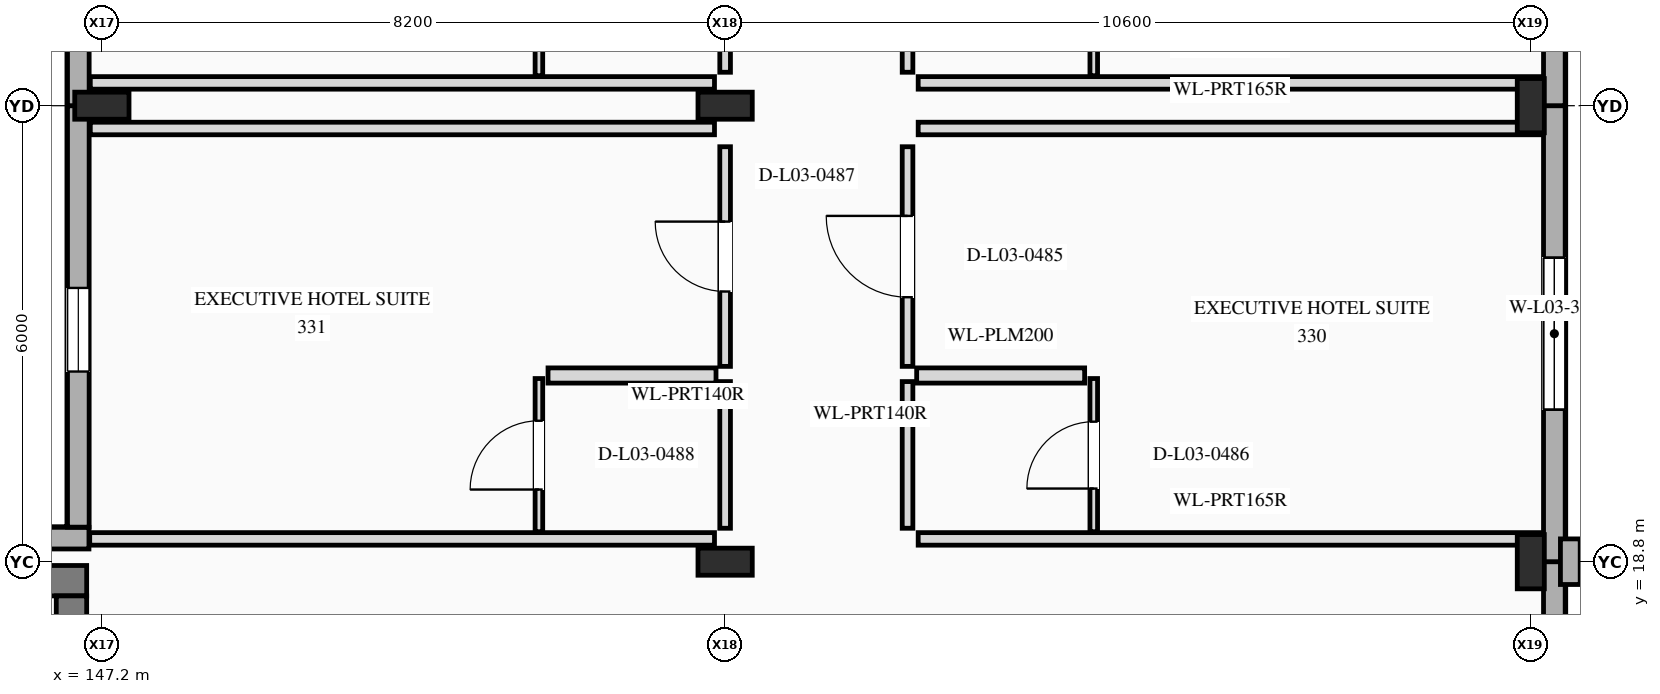
"""IFC4 building model, lengths in metres.
Left out: names, types, materials, properties, quantities, classifications, styles, units other than length and angle.
Written with IfcOpenShell. Run it as: python <this file> out.ifc"""

import sys

from ifc_helpers import new_model, si_unit, direction, frame, frame_2d, origin, origin_2d, place, context, subcontext, project, spatial, rectangle, i_section, extrude, element, fill, save


model = new_model("IFC4")
c1 = context("Model", 3, precision=1e-05, world=origin(), true_north=direction((0.0, 1.0)))
c2 = subcontext(c1, "Body", "Model", "MODEL_VIEW")
j1 = project(units=[si_unit("LENGTHUNIT", "METRE"), si_unit("PLANEANGLEUNIT", "RADIAN")], contexts=[c1])
p1 = place(None, origin())
s1 = spatial("IfcSite", under=j1, at=p1, CompositionType="ELEMENT")
p2 = place(p1, origin())
s2 = spatial("IfcBuilding", under=s1, at=p2, CompositionType="ELEMENT")
p3 = place(p2, frame((0.0, 0.0, 15.6)))
s3 = spatial("IfcBuildingStorey", under=s2, at=p3, CompositionType="ELEMENT", Elevation=15.6)
for number, where, z_axis, x_axis in (
    (1, (147.2, 24.8, 0.0), (0.0, 0.0, 1.0), (0.0, 1.0, 0.0)),
    (2, (155.4, 18.8, 0.0), (0.0, 0.0, 1.0), (0.0, 1.0, 0.0)),
    (3, (155.4, 24.8, 0.0), (0.0, 0.0, 1.0), (0.0, 1.0, 0.0)),
    (4, (166.0, 18.8, 0.0), (0.0, 0.0, 1.0), (1.0, 0.0, 0.0)),
    (5, (166.0, 24.8, 0.0), (0.0, 0.0, 1.0), (1.0, 0.0, 0.0)),
):
    element("IfcColumn", number, at=place(p3, frame(where, z_axis=z_axis, x_axis=x_axis)), inside=s3, PredefinedType="COLUMN", context=c2, shape_type="SweptSolid", body=[
        extrude(i_section(OverallWidth=0.356, OverallDepth=0.714, WebThickness=0.019, FlangeThickness=0.034, at=origin_2d()), origin(), (0.0, 0.0, 1.0), 3.9),
    ])
p4 = place(p3, frame((166.31, 8.2, 0.0), z_axis=(0.0, 0.0, 1.0), x_axis=(0.0, 1.0, 0.0)))
e6 = element("IfcWall", 6, at=p4, inside=s3, PredefinedType="STANDARD", context=c2, shape_type="SweptSolid", body=[
    extrude(rectangle(XDim=10.6, YDim=0.285, at=frame_2d((5.3, 0.0))), origin(), (0.0, 0.0, 1.0), 3.9),
])
p5 = place(p4, frame((4.55, 0.0, 0.88)))
e7 = element("IfcOpeningElement", 7, at=p5, cuts=e6, PredefinedType="OPENING", context=c2, shape_type="SweptSolid", body=[
    extrude(rectangle(XDim=1.5, YDim=1.7, at=frame_2d((0.75, 0.85))), frame((0.0, 0.152, 0.0), z_axis=(0.0, -1.0, 0.0), x_axis=(1.0, 0.0, 0.0)), (0.0, 0.0, 1.0), 0.305),
])
p6 = place(p3, frame((166.31, 18.8, 0.0), z_axis=(0.0, 0.0, 1.0), x_axis=(0.0, 1.0, 0.0)))
e8 = element("IfcWall", 8, at=p6, inside=s3, PredefinedType="STANDARD", context=c2, shape_type="SweptSolid", body=[
    extrude(rectangle(XDim=6.0, YDim=0.285, at=frame_2d((3.0, 0.0))), origin(), (0.0, 0.0, 1.0), 3.9),
])
p7 = place(p6, frame((2.0, 0.0, 0.85)))
e9 = element("IfcOpeningElement", 9, at=p7, cuts=e8, PredefinedType="OPENING", context=c2, shape_type="SweptSolid", body=[
    extrude(rectangle(XDim=2.0, YDim=1.65, at=frame_2d((1.0, 0.825))), frame((0.0, 0.152, 0.0), z_axis=(0.0, -1.0, 0.0), x_axis=(1.0, 0.0, 0.0)), (0.0, 0.0, 1.0), 0.305),
])
p8 = place(p3, frame((166.52, 18.5, 0.0), z_axis=(0.0, 0.0, 1.0), x_axis=(0.0, 1.0, 0.0)))
e10 = element("IfcWall", 10, at=p8, inside=s3, PredefinedType="ELEMENTEDWALL", context=c2, shape_type="SweptSolid", body=[
    extrude(rectangle(XDim=0.6, YDim=0.26, at=frame_2d((0.3, 0.0))), origin(), (0.0, 0.0, 1.0), 3.9),
])
p9 = place(p3, frame((166.31, 24.8, 0.0), z_axis=(0.0, 0.0, 1.0), x_axis=(0.0, 1.0, 0.0)))
e11 = element("IfcWall", 11, at=p9, inside=s3, PredefinedType="STANDARD", context=c2, shape_type="SweptSolid", body=[
    extrude(rectangle(XDim=1.34, YDim=0.285, at=frame_2d((0.67, 0.0))), origin(), (0.0, 0.0, 1.0), 3.9),
])
p10 = place(p3, frame((147.03, 19.11, 0.0), z_axis=(0.0, 0.0, 1.0), x_axis=(-1.0, 0.0, 0.0)))
e12 = element("IfcWall", 12, at=p10, inside=s3, PredefinedType="STANDARD", context=c2, shape_type="SweptSolid", body=[
    extrude(rectangle(XDim=11.03, YDim=0.285, at=frame_2d((5.515, 0.0))), origin(), (0.0, 0.0, 1.0), 3.9),
])
p11 = place(p3, frame((146.89, 19.254, 0.0), z_axis=(0.0, 0.0, 1.0), x_axis=(0.0, 1.0, 0.0)))
e13 = element("IfcWall", 13, at=p11, inside=s3, PredefinedType="STANDARD", context=c2, shape_type="SweptSolid", body=[
    extrude(rectangle(XDim=5.546, YDim=0.285, at=frame_2d((2.773, 0.0))), origin(), (0.0, 0.0, 1.0), 3.9),
])
p12 = place(p11, frame((2.048, 0.0, 0.85)))
e14 = element("IfcOpeningElement", 14, at=p12, cuts=e13, PredefinedType="OPENING", context=c2, shape_type="SweptSolid", body=[
    extrude(rectangle(XDim=1.1, YDim=1.5, at=frame_2d((0.55, 0.75))), frame((0.0, 0.152, 0.0), z_axis=(0.0, -1.0, 0.0), x_axis=(1.0, 0.0, 0.0)), (0.0, 0.0, 1.0), 0.305),
])
p13 = place(p3, frame((146.89, 24.8, 0.0), z_axis=(0.0, 0.0, 1.0), x_axis=(0.0, 1.0, 0.0)))
e15 = element("IfcWall", 15, at=p13, inside=s3, PredefinedType="STANDARD", context=c2, shape_type="SweptSolid", body=[
    extrude(rectangle(XDim=8.4, YDim=0.285, at=frame_2d((4.2, 0.0))), origin(), (0.0, 0.0, 1.0), 3.9),
])
p14 = place(p13, frame((3.3, 0.0, 0.85)))
e16 = element("IfcOpeningElement", 16, at=p14, cuts=e15, PredefinedType="OPENING", context=c2, shape_type="SweptSolid", body=[
    extrude(rectangle(XDim=1.8, YDim=1.8, at=frame_2d((0.9, 0.9))), frame((0.0, 0.152, 0.0), z_axis=(0.0, -1.0, 0.0), x_axis=(1.0, 0.0, 0.0)), (0.0, 0.0, 1.0), 0.305),
])
p15 = place(p3, frame((147.0, 18.55, 0.0), z_axis=(0.0, 0.0, 1.0), x_axis=(-1.0, 0.0, 0.0)))
e17 = element("IfcWall", 17, at=p15, inside=s3, PredefinedType="SHEAR", context=c2, shape_type="SweptSolid", body=[
    extrude(rectangle(XDim=10.6, YDim=0.4, at=frame_2d((5.3, 0.0))), origin(), (0.0, 0.0, 1.0), 3.9),
])
p16 = place(p3, frame((146.8, 11.0, 0.0), z_axis=(0.0, 0.0, 1.0), x_axis=(0.0, 1.0, 0.0)))
e18 = element("IfcWall", 18, at=p16, inside=s3, PredefinedType="SHEAR", context=c2, shape_type="SweptSolid", body=[
    extrude(rectangle(XDim=7.35, YDim=0.4, at=frame_2d((3.675, 0.0))), origin(), (0.0, 0.0, 1.0), 3.9),
])
p17 = place(p16, frame((5.0, 0.0, 0.0)))
e19 = element("IfcOpeningElement", 19, at=p17, cuts=e18, PredefinedType="OPENING", context=c2, shape_type="SweptSolid", body=[
    extrude(rectangle(XDim=0.95, YDim=2.2, at=frame_2d((0.475, 1.1))), frame((0.0, 0.21, 0.0), z_axis=(0.0, -1.0, 0.0), x_axis=(1.0, 0.0, 0.0)), (0.0, 0.0, 1.0), 0.42),
])
p18 = place(p16, frame((0.175, 0.0, 0.0)))
e20 = element("IfcOpeningElement", 20, at=p18, cuts=e18, PredefinedType="OPENING", context=c2, shape_type="SweptSolid", body=[
    extrude(rectangle(XDim=1.15, YDim=2.25, at=frame_2d((0.575, 1.125))), frame((0.0, 0.21, 0.0), z_axis=(0.0, -1.0, 0.0), x_axis=(1.0, 0.0, 0.0)), (0.0, 0.0, 1.0), 0.42),
])
p19 = place(p16, frame((1.875, 0.0, 0.0)))
e21 = element("IfcOpeningElement", 21, at=p19, cuts=e18, PredefinedType="OPENING", context=c2, shape_type="SweptSolid", body=[
    extrude(rectangle(XDim=1.15, YDim=2.25, at=frame_2d((0.575, 1.125))), frame((0.0, 0.21, 0.0), z_axis=(0.0, -1.0, 0.0), x_axis=(1.0, 0.0, 0.0)), (0.0, 0.0, 1.0), 0.42),
])
p20 = place(p3, frame((157.8, 19.24, 0.0), z_axis=(0.0, 0.0, 1.0), x_axis=(0.0, 1.0, 0.0)))
e22 = element("IfcWall", 22, at=p20, inside=s3, PredefinedType="PARTITIONING", context=c2, shape_type="SweptSolid", body=[
    extrude(rectangle(XDim=1.93, YDim=0.14, at=frame_2d((0.965, 0.0))), origin(), (0.0, 0.0, 1.0), 3.158),
])
p21 = place(p3, frame((157.8, 21.37, 0.0), z_axis=(0.0, 0.0, 1.0), x_axis=(0.0, 1.0, 0.0)))
e23 = element("IfcWall", 23, at=p21, inside=s3, PredefinedType="PARTITIONING", context=c2, shape_type="SweptSolid", body=[
    extrude(rectangle(XDim=2.89, YDim=0.14, at=frame_2d((1.445, 0.0))), origin(), (0.0, 0.0, 1.0), 3.158),
])
p22 = place(p21, frame((0.91, 0.0, 0.0)))
e24 = element("IfcOpeningElement", 24, at=p22, cuts=e23, PredefinedType="OPENING", context=c2, shape_type="SweptSolid", body=[
    extrude(rectangle(XDim=1.07, YDim=2.4, at=frame_2d((0.535, 1.2))), frame((0.0, 0.08, 0.0), z_axis=(0.0, -1.0, 0.0), x_axis=(1.0, 0.0, 0.0)), (0.0, 0.0, 1.0), 0.16),
])
for number, where, z_axis, x_axis in (
    (25, (157.94, 19.1, 0.0), (0.0, 0.0, 1.0), (1.0, 0.0, 0.0)),
    (26, (157.94, 24.5, 0.0), (0.0, 0.0, 1.0), (1.0, 0.0, 0.0)),
):
    element("IfcWall", number, at=place(p3, frame(where, z_axis=z_axis, x_axis=x_axis)), inside=s3, PredefinedType="PARTITIONING", context=c2, shape_type="SweptSolid", body=[
        extrude(rectangle(XDim=8.213, YDim=0.165, at=frame_2d((4.106, 0.0))), origin(), (0.0, 0.0, 1.0), 2.99),
    ])
p23 = place(p3, frame((157.92, 21.25, 0.0), z_axis=(0.0, 0.0, 1.0), x_axis=(1.0, 0.0, 0.0)))
e27 = element("IfcWall", 27, at=p23, inside=s3, PredefinedType="PLUMBINGWALL", context=c2, shape_type="SweptSolid", body=[
    extrude(rectangle(XDim=2.21, YDim=0.2, at=frame_2d((1.105, 0.0))), origin(), (0.0, 0.0, 1.0), 3.6),
])
p24 = place(p3, frame((160.25, 19.195, 0.0), z_axis=(0.0, 0.0, 1.0), x_axis=(0.0, 1.0, 0.0)))
e28 = element("IfcWall", 28, at=p24, inside=s3, PredefinedType="PARTITIONING", context=c2, shape_type="SweptSolid", body=[
    extrude(rectangle(XDim=2.015, YDim=0.1, at=frame_2d((1.008, 0.0))), origin(), (0.0, 0.0, 1.0), 3.158),
])
p25 = place(p24, frame((0.568, 0.0, 0.0)))
e29 = element("IfcOpeningElement", 29, at=p25, cuts=e28, PredefinedType="OPENING", context=c2, shape_type="SweptSolid", body=[
    extrude(rectangle(XDim=0.88, YDim=2.1, at=frame_2d((0.44, 1.05))), frame((0.0, 0.06, 0.0), z_axis=(0.0, -1.0, 0.0), x_axis=(1.0, 0.0, 0.0)), (0.0, 0.0, 1.0), 0.12),
])
p26 = place(p3, frame((155.4, 19.24, 0.0), z_axis=(0.0, 0.0, 1.0), x_axis=(0.0, 1.0, 0.0)))
e30 = element("IfcWall", 30, at=p26, inside=s3, PredefinedType="PARTITIONING", context=c2, shape_type="SweptSolid", body=[
    extrude(rectangle(XDim=1.93, YDim=0.14, at=frame_2d((0.965, 0.0))), origin(), (0.0, 0.0, 1.0), 3.074),
])
p27 = place(p3, frame((155.4, 21.37, 0.0), z_axis=(0.0, 0.0, 1.0), x_axis=(0.0, 1.0, 0.0)))
e31 = element("IfcWall", 31, at=p27, inside=s3, PredefinedType="PARTITIONING", context=c2, shape_type="SweptSolid", body=[
    extrude(rectangle(XDim=2.89, YDim=0.14, at=frame_2d((1.445, 0.0))), origin(), (0.0, 0.0, 1.0), 3.074),
])
p28 = place(p27, frame((0.985, 0.0, 0.0)))
e32 = element("IfcOpeningElement", 32, at=p28, cuts=e31, PredefinedType="OPENING", context=c2, shape_type="SweptSolid", body=[
    extrude(rectangle(XDim=0.92, YDim=2.15, at=frame_2d((0.46, 1.075))), frame((0.0, 0.08, 0.0), z_axis=(0.0, -1.0, 0.0), x_axis=(1.0, 0.0, 0.0)), (0.0, 0.0, 1.0), 0.16),
])
p29 = place(p3, frame((147.04, 19.1, 0.0), z_axis=(0.0, 0.0, 1.0), x_axis=(1.0, 0.0, 0.0)))
e33 = element("IfcWall", 33, at=p29, inside=s3, PredefinedType="PARTITIONING", context=c2, shape_type="SweptSolid", body=[
    extrude(rectangle(XDim=8.22, YDim=0.165, at=frame_2d((4.11, 0.0))), origin(), (0.0, 0.0, 1.0), 3.6),
])
p30 = place(p3, frame((147.048, 24.5, 0.0), z_axis=(0.0, 0.0, 1.0), x_axis=(1.0, 0.0, 0.0)))
e34 = element("IfcWall", 34, at=p30, inside=s3, PredefinedType="PARTITIONING", context=c2, shape_type="SweptSolid", body=[
    extrude(rectangle(XDim=8.212, YDim=0.165, at=frame_2d((4.106, 0.0))), origin(), (0.0, 0.0, 1.0), 3.013),
])
p31 = place(p3, frame((153.07, 21.25, 0.0), z_axis=(0.0, 0.0, 1.0), x_axis=(1.0, 0.0, 0.0)))
e35 = element("IfcWall", 35, at=p31, inside=s3, PredefinedType="PLUMBINGWALL", context=c2, shape_type="SweptSolid", body=[
    extrude(rectangle(XDim=2.21, YDim=0.2, at=frame_2d((1.105, 0.0))), origin(), (0.0, 0.0, 1.0), 3.6),
])
p32 = place(p3, frame((152.95, 19.195, 0.0), z_axis=(0.0, 0.0, 1.0), x_axis=(0.0, 1.0, 0.0)))
e36 = element("IfcWall", 36, at=p32, inside=s3, PredefinedType="PARTITIONING", context=c2, shape_type="SweptSolid", body=[
    extrude(rectangle(XDim=2.015, YDim=0.1, at=frame_2d((1.008, 0.0))), origin(), (0.0, 0.0, 1.0), 3.6),
])
p33 = place(p32, frame((0.555, 0.0, 0.0)))
e37 = element("IfcOpeningElement", 37, at=p33, cuts=e36, PredefinedType="OPENING", context=c2, shape_type="SweptSolid", body=[
    extrude(rectangle(XDim=0.905, YDim=2.1, at=frame_2d((0.453, 1.05))), frame((0.0, 0.06, 0.0), z_axis=(0.0, -1.0, 0.0), x_axis=(1.0, 0.0, 0.0)), (0.0, 0.0, 1.0), 0.12),
])
p34 = place(p3, frame((157.8, 25.24, 0.0), z_axis=(0.0, 0.0, 1.0), x_axis=(0.0, 1.0, 0.0)))
e38 = element("IfcWall", 38, at=p34, inside=s3, PredefinedType="PARTITIONING", context=c2, shape_type="SweptSolid", body=[
    extrude(rectangle(XDim=1.93, YDim=0.14, at=frame_2d((0.965, 0.0))), origin(), (0.0, 0.0, 1.0), 3.158),
])
p35 = place(p3, frame((157.94, 25.1, 0.0), z_axis=(0.0, 0.0, 1.0), x_axis=(1.0, 0.0, 0.0)))
e39 = element("IfcWall", 39, at=p35, inside=s3, PredefinedType="PARTITIONING", context=c2, shape_type="SweptSolid", body=[
    extrude(rectangle(XDim=8.213, YDim=0.165, at=frame_2d((4.106, 0.0))), origin(), (0.0, 0.0, 1.0), 2.99),
])
p36 = place(p3, frame((160.25, 25.195, 0.0), z_axis=(0.0, 0.0, 1.0), x_axis=(0.0, 1.0, 0.0)))
e40 = element("IfcWall", 40, at=p36, inside=s3, PredefinedType="PARTITIONING", context=c2, shape_type="SweptSolid", body=[
    extrude(rectangle(XDim=2.015, YDim=0.1, at=frame_2d((1.008, 0.0))), origin(), (0.0, 0.0, 1.0), 3.158),
])
p37 = place(p36, frame((0.543, 0.0, 0.0)))
e41 = element("IfcOpeningElement", 41, at=p37, cuts=e40, PredefinedType="OPENING", context=c2, shape_type="SweptSolid", body=[
    extrude(rectangle(XDim=0.93, YDim=2.14, at=frame_2d((0.465, 1.07))), frame((0.0, 0.06, 0.0), z_axis=(0.0, -1.0, 0.0), x_axis=(1.0, 0.0, 0.0)), (0.0, 0.0, 1.0), 0.12),
])
p38 = place(p3, frame((155.4, 25.24, 0.0), z_axis=(0.0, 0.0, 1.0), x_axis=(0.0, 1.0, 0.0)))
e42 = element("IfcWall", 42, at=p38, inside=s3, PredefinedType="PARTITIONING", context=c2, shape_type="SweptSolid", body=[
    extrude(rectangle(XDim=1.93, YDim=0.14, at=frame_2d((0.965, 0.0))), origin(), (0.0, 0.0, 1.0), 3.074),
])
p39 = place(p3, frame((147.048, 25.1, 0.0), z_axis=(0.0, 0.0, 1.0), x_axis=(1.0, 0.0, 0.0)))
e43 = element("IfcWall", 43, at=p39, inside=s3, PredefinedType="PARTITIONING", context=c2, shape_type="SweptSolid", body=[
    extrude(rectangle(XDim=8.212, YDim=0.165, at=frame_2d((4.106, 0.0))), origin(), (0.0, 0.0, 1.0), 3.013),
])
p40 = place(p3, frame((152.95, 25.195, 0.0), z_axis=(0.0, 0.0, 1.0), x_axis=(0.0, 1.0, 0.0)))
e44 = element("IfcWall", 44, at=p40, inside=s3, PredefinedType="PARTITIONING", context=c2, shape_type="SweptSolid", body=[
    extrude(rectangle(XDim=2.015, YDim=0.1, at=frame_2d((1.008, 0.0))), origin(), (0.0, 0.0, 1.0), 3.208),
])
p41 = place(p40, frame((0.53, 0.0, 0.0)))
e45 = element("IfcOpeningElement", 45, at=p41, cuts=e44, PredefinedType="OPENING", context=c2, shape_type="SweptSolid", body=[
    extrude(rectangle(XDim=0.955, YDim=2.14, at=frame_2d((0.478, 1.07))), frame((0.0, 0.06, 0.0), z_axis=(0.0, -1.0, 0.0), x_axis=(1.0, 0.0, 0.0)), (0.0, 0.0, 1.0), 0.12),
])
p42 = place(p7, origin())
e46 = element("IfcWindow", 46, at=p42, inside=s3, PartitioningType="SINGLE_PANEL", PredefinedType="WINDOW", context=c2, shape_type="SweptSolid", body=[
    extrude(rectangle(XDim=2.0, YDim=1.65, at=frame_2d((1.0, 0.825))), frame((0.0, 0.03, 0.0), z_axis=(0.0, -1.0, 0.0), x_axis=(1.0, 0.0, 0.0)), (0.0, 0.0, 1.0), 0.06),
])
fill(e9, e46)
p43 = place(p12, origin())
e47 = element("IfcWindow", 47, at=p43, inside=s3, PartitioningType="SINGLE_PANEL", PredefinedType="WINDOW", context=c2, shape_type="SweptSolid", body=[
    extrude(rectangle(XDim=1.1, YDim=1.5, at=frame_2d((0.55, 0.75))), frame((0.0, 0.03, 0.0), z_axis=(0.0, -1.0, 0.0), x_axis=(1.0, 0.0, 0.0)), (0.0, 0.0, 1.0), 0.06),
])
fill(e14, e47)
p44 = place(p22, origin())
e48 = element("IfcDoor", 48, at=p44, inside=s3, OperationType="SINGLE_SWING_RIGHT", PredefinedType="DOOR", context=c2, shape_type="SweptSolid", body=[
    extrude(rectangle(XDim=1.07, YDim=2.4, at=frame_2d((0.535, 1.2))), frame((0.0, 0.025, 0.0), z_axis=(0.0, -1.0, 0.0), x_axis=(1.0, 0.0, 0.0)), (0.0, 0.0, 1.0), 0.05),
])
fill(e24, e48)
p45 = place(p25, origin())
e49 = element("IfcDoor", 49, at=p45, inside=s3, OperationType="SINGLE_SWING_LEFT", PredefinedType="DOOR", context=c2, shape_type="SweptSolid", body=[
    extrude(rectangle(XDim=0.88, YDim=2.1, at=frame_2d((0.44, 1.05))), frame((0.0, 0.025, 0.0), z_axis=(0.0, -1.0, 0.0), x_axis=(1.0, 0.0, 0.0)), (0.0, 0.0, 1.0), 0.05),
])
fill(e29, e49)
p46 = place(p28, origin())
e50 = element("IfcDoor", 50, at=p46, inside=s3, OperationType="SINGLE_SWING_RIGHT", PredefinedType="DOOR", context=c2, shape_type="SweptSolid", body=[
    extrude(rectangle(XDim=0.92, YDim=2.15, at=frame_2d((0.46, 1.075))), frame((0.0, 0.025, 0.0), z_axis=(0.0, -1.0, 0.0), x_axis=(1.0, 0.0, 0.0)), (0.0, 0.0, 1.0), 0.05),
])
fill(e32, e50)
p47 = place(p33, origin())
e51 = element("IfcDoor", 51, at=p47, inside=s3, OperationType="SINGLE_SWING_LEFT", PredefinedType="DOOR", context=c2, shape_type="SweptSolid", body=[
    extrude(rectangle(XDim=0.905, YDim=2.1, at=frame_2d((0.453, 1.05))), frame((0.0, 0.025, 0.0), z_axis=(0.0, -1.0, 0.0), x_axis=(1.0, 0.0, 0.0)), (0.0, 0.0, 1.0), 0.05),
])
fill(e37, e51)
save(model, sys.argv[1])
